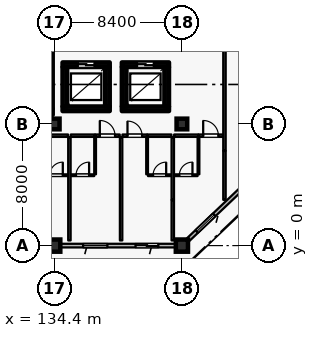
"""IFC4 building model, lengths in metres.
Left out: names, types, materials, properties, quantities, classifications, styles, units other than length and angle.
Written with IfcOpenShell. Run it as: python <this file> out.ifc"""

import sys

from ifc_helpers import new_model, si_unit, direction, frame, frame_2d, origin, origin_2d, place, context, subcontext, project, spatial, rectangle, extrude, element, fill, save


model = new_model("IFC4")
c1 = context("Model", 3, precision=1e-05, world=origin(), true_north=direction((0.0, 1.0)))
c2 = subcontext(c1, "Body", "Model", "MODEL_VIEW")
j1 = project(units=[si_unit("LENGTHUNIT", "METRE"), si_unit("PLANEANGLEUNIT", "RADIAN")], contexts=[c1])
p1 = place(None, origin())
s1 = spatial("IfcSite", under=j1, at=p1, CompositionType="ELEMENT")
p2 = place(p1, origin())
s2 = spatial("IfcBuilding", under=s1, at=p2, CompositionType="ELEMENT")
p3 = place(p2, frame((0.0, 0.0, 21.0)))
s3 = spatial("IfcBuildingStorey", under=s2, at=p3, CompositionType="ELEMENT", Elevation=21.0)
for number, where, z_axis, x_axis in (
    (1, (134.4, 0.0, 0.0), (0.0, 0.0, 1.0), (1.0, 0.0, 0.0)),
    (2, (142.8, 0.0, 0.0), (0.0, 0.0, 1.0), (1.0, 0.0, 0.0)),
):
    element("IfcColumn", number, at=place(p3, frame(where, z_axis=z_axis, x_axis=x_axis)), inside=s3, PredefinedType="COLUMN", context=c2, shape_type="SweptSolid", body=[
        extrude(rectangle(XDim=0.8, YDim=0.8, at=origin_2d()), origin(), (0.0, 0.0, 1.0), 4.2),
    ])
for number, where, z_axis, x_axis in (
    (3, (134.4, 8.0, 0.0), (0.0, 0.0, 1.0), (1.0, 0.0, 0.0)),
    (4, (142.8, 8.0, 0.0), (0.0, 0.0, 1.0), (1.0, 0.0, 0.0)),
):
    element("IfcColumn", number, at=place(p3, frame(where, z_axis=z_axis, x_axis=x_axis)), inside=s3, PredefinedType="COLUMN", context=c2, shape_type="SweptSolid", body=[
        extrude(rectangle(XDim=0.7, YDim=0.7, at=origin_2d()), origin(), (0.0, 0.0, 1.0), 4.2),
    ])
p4 = place(p3, frame((142.4, 0.0, 0.0), z_axis=(0.0, 0.0, 1.0), x_axis=(-1.0, 0.0, 0.0)))
e5 = element("IfcWall", 5, at=p4, inside=s3, PredefinedType="SOLIDWALL", context=c2, shape_type="SweptSolid", body=[
    extrude(rectangle(XDim=7.6, YDim=0.24, at=frame_2d((3.8, 0.0))), origin(), (0.0, 0.0, 1.0), 3.53),
])
p5 = place(p4, frame((1.15, 0.0, 0.0)))
e6 = element("IfcOpeningElement", 6, at=p5, cuts=e5, PredefinedType="OPENING", context=c2, shape_type="SweptSolid", body=[
    extrude(rectangle(XDim=1.5, YDim=2.25, at=frame_2d((0.75, 1.125))), frame((0.0, 0.13, 0.0), z_axis=(0.0, -1.0, 0.0), x_axis=(1.0, 0.0, 0.0)), (0.0, 0.0, 1.0), 0.26),
])
p6 = place(p4, frame((4.5, 0.0, 0.8)))
e7 = element("IfcOpeningElement", 7, at=p6, cuts=e5, PredefinedType="OPENING", context=c2, shape_type="SweptSolid", body=[
    extrude(rectangle(XDim=1.6, YDim=1.6, at=frame_2d((0.8, 0.8))), frame((0.0, 0.13, 0.0), z_axis=(0.0, -1.0, 0.0), x_axis=(1.0, 0.0, 0.0)), (0.0, 0.0, 1.0), 0.26),
])
p7 = place(p3, frame((150.8, 7.619, 0.0), z_axis=(0.0, 0.0, 1.0), x_axis=(-0.724156739794, -0.689635422677, 0.0)))
e8 = element("IfcWall", 8, at=p7, inside=s3, PredefinedType="SOLIDWALL", context=c2, shape_type="SweptSolid", body=[
    extrude(rectangle(XDim=10.495, YDim=0.24, at=frame_2d((5.248, 0.0))), origin(), (0.0, 0.0, 1.0), 3.53),
])
p8 = place(p7, frame((0.424, 0.0, 0.0)))
e9 = element("IfcOpeningElement", 9, at=p8, cuts=e8, PredefinedType="OPENING", context=c2, shape_type="SweptSolid", body=[
    extrude(rectangle(XDim=1.5, YDim=2.25, at=frame_2d((0.75, 1.125))), frame((0.0, 0.13, 0.0), z_axis=(0.0, -1.0, 0.0), x_axis=(1.0, 0.0, 0.0)), (0.0, 0.0, 1.0), 0.26),
])
p9 = place(p7, frame((4.033, 0.0, 0.8)))
e10 = element("IfcOpeningElement", 10, at=p9, cuts=e8, PredefinedType="OPENING", context=c2, shape_type="SweptSolid", body=[
    extrude(rectangle(XDim=1.6, YDim=1.6, at=frame_2d((0.8, 0.8))), frame((0.0, 0.13, 0.0), z_axis=(0.0, -1.0, 0.0), x_axis=(1.0, 0.0, 0.0)), (0.0, 0.0, 1.0), 0.26),
])
p10 = place(p7, frame((8.107, 0.0, 0.8)))
e11 = element("IfcOpeningElement", 11, at=p10, cuts=e8, PredefinedType="OPENING", context=c2, shape_type="SweptSolid", body=[
    extrude(rectangle(XDim=1.6, YDim=1.6, at=frame_2d((0.8, 0.8))), frame((0.0, 0.13, 0.0), z_axis=(0.0, -1.0, 0.0), x_axis=(1.0, 0.0, 0.0)), (0.0, 0.0, 1.0), 0.26),
])
p11 = place(p3, frame((134.95, 9.0, 0.0), z_axis=(0.0, 0.0, 1.0), x_axis=(1.0, 0.0, 0.0)))
e12 = element("IfcWall", 12, at=p11, inside=s3, PredefinedType="SHEAR", context=c2, shape_type="SweptSolid", body=[
    extrude(rectangle(XDim=3.1, YDim=0.3, at=frame_2d((1.55, 0.0))), origin(), (0.0, 0.0, 1.0), 3.965),
])
p12 = place(p3, frame((137.9, 9.155, 0.0), z_axis=(0.0, 0.0, 1.0), x_axis=(0.0, 1.0, 0.0)))
e13 = element("IfcWall", 13, at=p12, inside=s3, PredefinedType="SHEAR", context=c2, shape_type="SweptSolid", body=[
    extrude(rectangle(XDim=2.59, YDim=0.3, at=frame_2d((1.295, 0.0))), origin(), (0.0, 0.0, 1.0), 3.965),
])
p13 = place(p3, frame((138.05, 11.9, 0.0), z_axis=(0.0, 0.0, 1.0), x_axis=(-1.0, 0.0, 0.0)))
e14 = element("IfcWall", 14, at=p13, inside=s3, PredefinedType="SHEAR", context=c2, shape_type="SweptSolid", body=[
    extrude(rectangle(XDim=3.1, YDim=0.3, at=frame_2d((1.55, 0.0))), origin(), (0.0, 0.0, 1.0), 3.965),
])
p14 = place(p13, frame((1.0, 0.0, 0.0)))
e15 = element("IfcOpeningElement", 15, at=p14, cuts=e14, PredefinedType="OPENING", context=c2, shape_type="SweptSolid", body=[
    extrude(rectangle(XDim=1.1, YDim=2.2, at=frame_2d((0.55, 1.1))), frame((0.0, 0.16, 0.0), z_axis=(0.0, -1.0, 0.0), x_axis=(1.0, 0.0, 0.0)), (0.0, 0.0, 1.0), 0.32),
])
p15 = place(p3, frame((135.1, 11.745, 0.0), z_axis=(0.0, 0.0, 1.0), x_axis=(0.0, -1.0, 0.0)))
e16 = element("IfcWall", 16, at=p15, inside=s3, PredefinedType="SHEAR", context=c2, shape_type="SweptSolid", body=[
    extrude(rectangle(XDim=2.59, YDim=0.3, at=frame_2d((1.295, 0.0))), origin(), (0.0, 0.0, 1.0), 3.965),
])
p16 = place(p3, frame((138.85, 9.0, 0.0), z_axis=(0.0, 0.0, 1.0), x_axis=(1.0, 0.0, 0.0)))
e17 = element("IfcWall", 17, at=p16, inside=s3, PredefinedType="SHEAR", context=c2, shape_type="SweptSolid", body=[
    extrude(rectangle(XDim=3.1, YDim=0.3, at=frame_2d((1.55, 0.0))), origin(), (0.0, 0.0, 1.0), 3.965),
])
p17 = place(p3, frame((141.8, 9.155, 0.0), z_axis=(0.0, 0.0, 1.0), x_axis=(0.0, 1.0, 0.0)))
e18 = element("IfcWall", 18, at=p17, inside=s3, PredefinedType="SHEAR", context=c2, shape_type="SweptSolid", body=[
    extrude(rectangle(XDim=2.59, YDim=0.3, at=frame_2d((1.295, 0.0))), origin(), (0.0, 0.0, 1.0), 3.965),
])
p18 = place(p3, frame((141.95, 11.9, 0.0), z_axis=(0.0, 0.0, 1.0), x_axis=(-1.0, 0.0, 0.0)))
e19 = element("IfcWall", 19, at=p18, inside=s3, PredefinedType="SHEAR", context=c2, shape_type="SweptSolid", body=[
    extrude(rectangle(XDim=3.1, YDim=0.3, at=frame_2d((1.55, 0.0))), origin(), (0.0, 0.0, 1.0), 3.965),
])
p19 = place(p18, frame((1.0, 0.0, 0.0)))
e20 = element("IfcOpeningElement", 20, at=p19, cuts=e19, PredefinedType="OPENING", context=c2, shape_type="SweptSolid", body=[
    extrude(rectangle(XDim=1.1, YDim=2.2, at=frame_2d((0.55, 1.1))), frame((0.0, 0.16, 0.0), z_axis=(0.0, -1.0, 0.0), x_axis=(1.0, 0.0, 0.0)), (0.0, 0.0, 1.0), 0.32),
])
p20 = place(p3, frame((139.0, 11.745, 0.0), z_axis=(0.0, 0.0, 1.0), x_axis=(0.0, -1.0, 0.0)))
e21 = element("IfcWall", 21, at=p20, inside=s3, PredefinedType="SHEAR", context=c2, shape_type="SweptSolid", body=[
    extrude(rectangle(XDim=2.59, YDim=0.3, at=frame_2d((1.295, 0.0))), origin(), (0.0, 0.0, 1.0), 3.965),
])
p21 = place(p3, frame((126.1, 8.8, 0.0), z_axis=(0.0, 0.0, 1.0), x_axis=(1.0, 0.0, 0.0)))
e22 = element("IfcWall", 22, at=p21, inside=s3, PredefinedType="SHEAR", context=c2, shape_type="SweptSolid", body=[
    extrude(rectangle(XDim=8.2, YDim=0.4, at=frame_2d((4.1, 0.0))), origin(), (0.0, 0.0, 1.0), 3.965),
])
p22 = place(p3, frame((134.1, 9.005, 0.0), z_axis=(0.0, 0.0, 1.0), x_axis=(0.0, 1.0, 0.0)))
e23 = element("IfcWall", 23, at=p22, inside=s3, PredefinedType="SHEAR", context=c2, shape_type="SweptSolid", body=[
    extrude(rectangle(XDim=3.95, YDim=0.4, at=frame_2d((1.975, 0.0))), origin(), (0.0, 0.0, 1.0), 3.965),
])
p23 = place(p3, frame((133.72, 7.23, 0.0), z_axis=(0.0, 0.0, 1.0), x_axis=(1.0, 0.0, 0.0)))
e24 = element("IfcWall", 24, at=p23, inside=s3, PredefinedType="PARTITIONING", context=c2, shape_type="SweptSolid", body=[
    extrude(rectangle(XDim=1.59, YDim=0.16, at=frame_2d((0.795, 0.0))), origin(), (0.0, 0.0, 1.0), 3.965),
])
p24 = place(p3, frame((133.77, 4.63, 0.0), z_axis=(0.0, 0.0, 1.0), x_axis=(1.0, 0.0, 0.0)))
e25 = element("IfcWall", 25, at=p24, inside=s3, PredefinedType="PARTITIONING", context=c2, shape_type="SweptSolid", body=[
    extrude(rectangle(XDim=1.53, YDim=0.115, at=frame_2d((0.765, 0.0))), origin(), (0.0, 0.0, 1.0), 3.965),
])
p25 = place(p24, frame((0.335, 0.0, 0.0)))
e26 = element("IfcOpeningElement", 26, at=p25, cuts=e25, PredefinedType="OPENING", context=c2, shape_type="SweptSolid", body=[
    extrude(rectangle(XDim=0.86, YDim=2.12, at=frame_2d((0.43, 1.06))), frame((0.0, 0.067, 0.0), z_axis=(0.0, -1.0, 0.0), x_axis=(1.0, 0.0, 0.0)), (0.0, 0.0, 1.0), 0.135),
])
p26 = place(p3, frame((135.49, 7.23, 0.0), z_axis=(0.0, 0.0, 1.0), x_axis=(1.0, 0.0, 0.0)))
e27 = element("IfcWall", 27, at=p26, inside=s3, PredefinedType="PARTITIONING", context=c2, shape_type="SweptSolid", body=[
    extrude(rectangle(XDim=1.59, YDim=0.16, at=frame_2d((0.795, 0.0))), origin(), (0.0, 0.0, 1.0), 3.965),
])
p27 = place(p3, frame((137.09, 7.23, 0.0), z_axis=(0.0, 0.0, 1.0), x_axis=(1.0, 0.0, 0.0)))
e28 = element("IfcWall", 28, at=p27, inside=s3, PredefinedType="PARTITIONING", context=c2, shape_type="SweptSolid", body=[
    extrude(rectangle(XDim=1.62, YDim=0.16, at=frame_2d((0.81, 0.0))), origin(), (0.0, 0.0, 1.0), 3.965),
])
p28 = place(p27, frame((0.31, 0.0, 0.0)))
e29 = element("IfcOpeningElement", 29, at=p28, cuts=e28, PredefinedType="OPENING", context=c2, shape_type="SweptSolid", body=[
    extrude(rectangle(XDim=1.0, YDim=2.25, at=frame_2d((0.5, 1.125))), frame((0.0, 0.09, 0.0), z_axis=(0.0, -1.0, 0.0), x_axis=(1.0, 0.0, 0.0)), (0.0, 0.0, 1.0), 0.18),
])
p29 = place(p3, frame((137.09, 4.69, 0.0), z_axis=(0.0, 0.0, 1.0), x_axis=(0.0, 1.0, 0.0)))
e30 = element("IfcWall", 30, at=p29, inside=s3, PredefinedType="PARTITIONING", context=c2, shape_type="SweptSolid", body=[
    extrude(rectangle(XDim=2.45, YDim=0.115, at=frame_2d((1.225, 0.0))), origin(), (0.0, 0.0, 1.0), 3.965),
])
p30 = place(p3, frame((135.5, 4.63, 0.0), z_axis=(0.0, 0.0, 1.0), x_axis=(1.0, 0.0, 0.0)))
e31 = element("IfcWall", 31, at=p30, inside=s3, PredefinedType="PARTITIONING", context=c2, shape_type="SweptSolid", body=[
    extrude(rectangle(XDim=1.53, YDim=0.115, at=frame_2d((0.765, 0.0))), origin(), (0.0, 0.0, 1.0), 3.965),
])
p31 = place(p30, frame((0.335, 0.0, 0.0)))
e32 = element("IfcOpeningElement", 32, at=p31, cuts=e31, PredefinedType="OPENING", context=c2, shape_type="SweptSolid", body=[
    extrude(rectangle(XDim=0.86, YDim=2.12, at=frame_2d((0.43, 1.06))), frame((0.0, 0.067, 0.0), z_axis=(0.0, -1.0, 0.0), x_axis=(1.0, 0.0, 0.0)), (0.0, 0.0, 1.0), 0.135),
])
p32 = place(p3, frame((135.4, 0.34, 0.0), z_axis=(0.0, 0.0, 1.0), x_axis=(0.0, 1.0, 0.0)))
e33 = element("IfcWall", 33, at=p32, inside=s3, PredefinedType="PARTITIONING", context=c2, shape_type="SweptSolid", body=[
    extrude(rectangle(XDim=6.8, YDim=0.16, at=frame_2d((3.4, 0.0))), origin(), (0.0, 0.0, 1.0), 3.965),
])
p33 = place(p3, frame((138.89, 7.23, 0.0), z_axis=(0.0, 0.0, 1.0), x_axis=(1.0, 0.0, 0.0)))
e34 = element("IfcWall", 34, at=p33, inside=s3, PredefinedType="PARTITIONING", context=c2, shape_type="SweptSolid", body=[
    extrude(rectangle(XDim=1.62, YDim=0.16, at=frame_2d((0.81, 0.0))), origin(), (0.0, 0.0, 1.0), 3.965),
])
p34 = place(p33, frame((0.33, 0.0, 0.0)))
e35 = element("IfcOpeningElement", 35, at=p34, cuts=e34, PredefinedType="OPENING", context=c2, shape_type="SweptSolid", body=[
    extrude(rectangle(XDim=0.96, YDim=2.2, at=frame_2d((0.48, 1.1))), frame((0.0, 0.09, 0.0), z_axis=(0.0, -1.0, 0.0), x_axis=(1.0, 0.0, 0.0)), (0.0, 0.0, 1.0), 0.18),
])
p35 = place(p3, frame((140.52, 7.23, 0.0), z_axis=(0.0, 0.0, 1.0), x_axis=(1.0, 0.0, 0.0)))
e36 = element("IfcWall", 36, at=p35, inside=s3, PredefinedType="PARTITIONING", context=c2, shape_type="SweptSolid", body=[
    extrude(rectangle(XDim=1.59, YDim=0.16, at=frame_2d((0.795, 0.0))), origin(), (0.0, 0.0, 1.0), 3.965),
])
p36 = place(p3, frame((140.51, 4.69, 0.0), z_axis=(0.0, 0.0, 1.0), x_axis=(0.0, 1.0, 0.0)))
e37 = element("IfcWall", 37, at=p36, inside=s3, PredefinedType="PARTITIONING", context=c2, shape_type="SweptSolid", body=[
    extrude(rectangle(XDim=2.45, YDim=0.115, at=frame_2d((1.225, 0.0))), origin(), (0.0, 0.0, 1.0), 3.965),
])
p37 = place(p3, frame((140.57, 4.63, 0.0), z_axis=(0.0, 0.0, 1.0), x_axis=(1.0, 0.0, 0.0)))
e38 = element("IfcWall", 38, at=p37, inside=s3, PredefinedType="PARTITIONING", context=c2, shape_type="SweptSolid", body=[
    extrude(rectangle(XDim=1.53, YDim=0.115, at=frame_2d((0.765, 0.0))), origin(), (0.0, 0.0, 1.0), 3.965),
])
p38 = place(p37, frame((0.335, 0.0, 0.0)))
e39 = element("IfcOpeningElement", 39, at=p38, cuts=e38, PredefinedType="OPENING", context=c2, shape_type="SweptSolid", body=[
    extrude(rectangle(XDim=0.86, YDim=2.12, at=frame_2d((0.43, 1.06))), frame((0.0, 0.067, 0.0), z_axis=(0.0, -1.0, 0.0), x_axis=(1.0, 0.0, 0.0)), (0.0, 0.0, 1.0), 0.135),
])
p39 = place(p3, frame((138.8, 0.34, 0.0), z_axis=(0.0, 0.0, 1.0), x_axis=(0.0, 1.0, 0.0)))
e40 = element("IfcWall", 40, at=p39, inside=s3, PredefinedType="PARTITIONING", context=c2, shape_type="SweptSolid", body=[
    extrude(rectangle(XDim=6.8, YDim=0.16, at=frame_2d((3.4, 0.0))), origin(), (0.0, 0.0, 1.0), 3.965),
])
p40 = place(p3, frame((142.2, 0.34, 0.0), z_axis=(0.0, 0.0, 1.0), x_axis=(0.0, 1.0, 0.0)))
e41 = element("IfcWall", 41, at=p40, inside=s3, PredefinedType="PARTITIONING", context=c2, shape_type="SweptSolid", body=[
    extrude(rectangle(XDim=2.66, YDim=0.16, at=frame_2d((1.33, 0.0))), origin(), (0.0, 0.0, 1.0), 3.965),
])
p41 = place(p3, frame((142.29, 7.23, 0.0), z_axis=(0.0, 0.0, 1.0), x_axis=(1.0, 0.0, 0.0)))
e42 = element("IfcWall", 42, at=p41, inside=s3, PredefinedType="PARTITIONING", context=c2, shape_type="SweptSolid", body=[
    extrude(rectangle(XDim=1.59, YDim=0.16, at=frame_2d((0.795, 0.0))), origin(), (0.0, 0.0, 1.0), 3.965),
])
p42 = place(p3, frame((143.89, 7.23, 0.0), z_axis=(0.0, 0.0, 1.0), x_axis=(1.0, 0.0, 0.0)))
e43 = element("IfcWall", 43, at=p42, inside=s3, PredefinedType="PARTITIONING", context=c2, shape_type="SweptSolid", body=[
    extrude(rectangle(XDim=1.62, YDim=0.16, at=frame_2d((0.81, 0.0))), origin(), (0.0, 0.0, 1.0), 3.965),
])
p43 = place(p42, frame((0.31, 0.0, 0.0)))
e44 = element("IfcOpeningElement", 44, at=p43, cuts=e43, PredefinedType="OPENING", context=c2, shape_type="SweptSolid", body=[
    extrude(rectangle(XDim=1.0, YDim=2.25, at=frame_2d((0.5, 1.125))), frame((0.0, 0.09, 0.0), z_axis=(0.0, -1.0, 0.0), x_axis=(1.0, 0.0, 0.0)), (0.0, 0.0, 1.0), 0.18),
])
p44 = place(p3, frame((143.89, 4.69, 0.0), z_axis=(0.0, 0.0, 1.0), x_axis=(0.0, 1.0, 0.0)))
e45 = element("IfcWall", 45, at=p44, inside=s3, PredefinedType="PARTITIONING", context=c2, shape_type="SweptSolid", body=[
    extrude(rectangle(XDim=2.45, YDim=0.115, at=frame_2d((1.225, 0.0))), origin(), (0.0, 0.0, 1.0), 3.965),
])
p45 = place(p3, frame((142.3, 4.63, 0.0), z_axis=(0.0, 0.0, 1.0), x_axis=(1.0, 0.0, 0.0)))
e46 = element("IfcWall", 46, at=p45, inside=s3, PredefinedType="PARTITIONING", context=c2, shape_type="SweptSolid", body=[
    extrude(rectangle(XDim=1.53, YDim=0.115, at=frame_2d((0.765, 0.0))), origin(), (0.0, 0.0, 1.0), 3.965),
])
p46 = place(p45, frame((0.335, 0.0, 0.0)))
e47 = element("IfcOpeningElement", 47, at=p46, cuts=e46, PredefinedType="OPENING", context=c2, shape_type="SweptSolid", body=[
    extrude(rectangle(XDim=0.86, YDim=2.12, at=frame_2d((0.43, 1.06))), frame((0.0, 0.067, 0.0), z_axis=(0.0, -1.0, 0.0), x_axis=(1.0, 0.0, 0.0)), (0.0, 0.0, 1.0), 0.135),
])
p47 = place(p3, frame((142.2, 3.01, 0.0), z_axis=(0.0, 0.0, 1.0), x_axis=(0.0, 1.0, 0.0)))
e48 = element("IfcWall", 48, at=p47, inside=s3, PredefinedType="PARTITIONING", context=c2, shape_type="SweptSolid", body=[
    extrude(rectangle(XDim=4.13, YDim=0.16, at=frame_2d((2.065, 0.0))), origin(), (0.0, 0.0, 1.0), 3.965),
])
p48 = place(p3, frame((145.6, 3.01, 0.0), z_axis=(0.0, 0.0, 1.0), x_axis=(0.0, 1.0, 0.0)))
e49 = element("IfcWall", 49, at=p48, inside=s3, PredefinedType="PARTITIONING", context=c2, shape_type="SweptSolid", body=[
    extrude(rectangle(XDim=3.22, YDim=0.16, at=frame_2d((1.61, 0.0))), origin(), (0.0, 0.0, 1.0), 3.965),
])
p49 = place(p3, frame((145.6, 6.24, 0.0), z_axis=(0.0, 0.0, 1.0), x_axis=(0.0, 1.0, 0.0)))
e50 = element("IfcWall", 50, at=p49, inside=s3, PredefinedType="PARTITIONING", context=c2, shape_type="SweptSolid", body=[
    extrude(rectangle(XDim=8.3, YDim=0.16, at=frame_2d((4.15, 0.0))), origin(), (0.0, 0.0, 1.0), 3.965),
])
p50 = place(p5, origin())
e51 = element("IfcDoor", 51, at=p50, inside=s3, OperationType="SLIDING_TO_LEFT", PredefinedType="DOOR", context=c2, shape_type="SweptSolid", body=[
    extrude(rectangle(XDim=1.5, YDim=2.25, at=frame_2d((0.75, 1.125))), frame((0.0, 0.025, 0.0), z_axis=(0.0, -1.0, 0.0), x_axis=(1.0, 0.0, 0.0)), (0.0, 0.0, 1.0), 0.05),
])
fill(e6, e51)
p51 = place(p6, origin())
e52 = element("IfcWindow", 52, at=p51, inside=s3, PartitioningType="SINGLE_PANEL", PredefinedType="WINDOW", context=c2, shape_type="SweptSolid", body=[
    extrude(rectangle(XDim=1.6, YDim=1.6, at=frame_2d((0.8, 0.8))), frame((0.0, 0.03, 0.0), z_axis=(0.0, -1.0, 0.0), x_axis=(1.0, 0.0, 0.0)), (0.0, 0.0, 1.0), 0.06),
])
fill(e7, e52)
p52 = place(p10, origin())
e53 = element("IfcWindow", 53, at=p52, inside=s3, PartitioningType="SINGLE_PANEL", PredefinedType="WINDOW", context=c2, shape_type="SweptSolid", body=[
    extrude(rectangle(XDim=1.6, YDim=1.6, at=frame_2d((0.8, 0.8))), frame((0.0, 0.03, 0.0), z_axis=(0.0, -1.0, 0.0), x_axis=(1.0, 0.0, 0.0)), (0.0, 0.0, 1.0), 0.06),
])
fill(e11, e53)
p53 = place(p14, origin())
e54 = element("IfcDoor", 54, at=p53, inside=s3, OperationType="DOUBLE_DOOR_SLIDING", PredefinedType="DOOR", context=c2, shape_type="SweptSolid", body=[
    extrude(rectangle(XDim=1.1, YDim=2.2, at=frame_2d((0.55, 1.1))), frame((0.0, 0.025, 0.0), z_axis=(0.0, -1.0, 0.0), x_axis=(1.0, 0.0, 0.0)), (0.0, 0.0, 1.0), 0.05),
])
fill(e15, e54)
p54 = place(p19, origin())
e55 = element("IfcDoor", 55, at=p54, inside=s3, OperationType="DOUBLE_DOOR_SLIDING", PredefinedType="DOOR", context=c2, shape_type="SweptSolid", body=[
    extrude(rectangle(XDim=1.1, YDim=2.2, at=frame_2d((0.55, 1.1))), frame((0.0, 0.025, 0.0), z_axis=(0.0, -1.0, 0.0), x_axis=(1.0, 0.0, 0.0)), (0.0, 0.0, 1.0), 0.05),
])
fill(e20, e55)
p55 = place(p25, origin())
e56 = element("IfcDoor", 56, at=p55, inside=s3, OperationType="SINGLE_SWING_RIGHT", PredefinedType="DOOR", context=c2, shape_type="SweptSolid", body=[
    extrude(rectangle(XDim=0.86, YDim=2.12, at=frame_2d((0.43, 1.06))), frame((0.0, 0.025, 0.0), z_axis=(0.0, -1.0, 0.0), x_axis=(1.0, 0.0, 0.0)), (0.0, 0.0, 1.0), 0.05),
])
fill(e26, e56)
p56 = place(p28, origin())
e57 = element("IfcDoor", 57, at=p56, inside=s3, OperationType="SINGLE_SWING_LEFT", PredefinedType="DOOR", context=c2, shape_type="SweptSolid", body=[
    extrude(rectangle(XDim=1.0, YDim=2.25, at=frame_2d((0.5, 1.125))), frame((0.0, 0.025, 0.0), z_axis=(0.0, -1.0, 0.0), x_axis=(1.0, 0.0, 0.0)), (0.0, 0.0, 1.0), 0.05),
])
fill(e29, e57)
p57 = place(p31, origin())
e58 = element("IfcDoor", 58, at=p57, inside=s3, OperationType="SINGLE_SWING_RIGHT", PredefinedType="DOOR", context=c2, shape_type="SweptSolid", body=[
    extrude(rectangle(XDim=0.86, YDim=2.12, at=frame_2d((0.43, 1.06))), frame((0.0, 0.025, 0.0), z_axis=(0.0, -1.0, 0.0), x_axis=(1.0, 0.0, 0.0)), (0.0, 0.0, 1.0), 0.05),
])
fill(e32, e58)
p58 = place(p34, origin())
e59 = element("IfcDoor", 59, at=p58, inside=s3, OperationType="SINGLE_SWING_LEFT", PredefinedType="DOOR", context=c2, shape_type="SweptSolid", body=[
    extrude(rectangle(XDim=0.96, YDim=2.2, at=frame_2d((0.48, 1.1))), frame((0.0, 0.025, 0.0), z_axis=(0.0, -1.0, 0.0), x_axis=(1.0, 0.0, 0.0)), (0.0, 0.0, 1.0), 0.05),
])
fill(e35, e59)
p59 = place(p38, origin())
e60 = element("IfcDoor", 60, at=p59, inside=s3, OperationType="SINGLE_SWING_RIGHT", PredefinedType="DOOR", context=c2, shape_type="SweptSolid", body=[
    extrude(rectangle(XDim=0.86, YDim=2.12, at=frame_2d((0.43, 1.06))), frame((0.0, 0.025, 0.0), z_axis=(0.0, -1.0, 0.0), x_axis=(1.0, 0.0, 0.0)), (0.0, 0.0, 1.0), 0.05),
])
fill(e39, e60)
p60 = place(p43, origin())
e61 = element("IfcDoor", 61, at=p60, inside=s3, OperationType="SINGLE_SWING_LEFT", PredefinedType="DOOR", context=c2, shape_type="SweptSolid", body=[
    extrude(rectangle(XDim=1.0, YDim=2.25, at=frame_2d((0.5, 1.125))), frame((0.0, 0.025, 0.0), z_axis=(0.0, -1.0, 0.0), x_axis=(1.0, 0.0, 0.0)), (0.0, 0.0, 1.0), 0.05),
])
fill(e44, e61)
p61 = place(p46, origin())
e62 = element("IfcDoor", 62, at=p61, inside=s3, OperationType="SINGLE_SWING_RIGHT", PredefinedType="DOOR", context=c2, shape_type="SweptSolid", body=[
    extrude(rectangle(XDim=0.86, YDim=2.12, at=frame_2d((0.43, 1.06))), frame((0.0, 0.025, 0.0), z_axis=(0.0, -1.0, 0.0), x_axis=(1.0, 0.0, 0.0)), (0.0, 0.0, 1.0), 0.05),
])
fill(e47, e62)
save(model, sys.argv[1])
